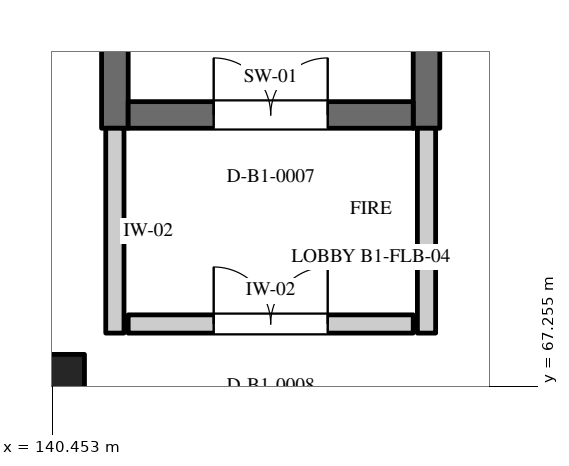
"""IFC4 building model, lengths in metres.
Left out: names, types, materials, properties, quantities, classifications, styles, units other than length and angle.
Written with IfcOpenShell. Run it as: python <this file> out.ifc"""

import sys

from ifc_helpers import new_model, si_unit, direction, frame, frame_2d, origin, origin_2d, place, context, subcontext, project, spatial, rectangle, extrude, element, fill, save


model = new_model("IFC4")
c1 = context("Model", 3, precision=1e-05, world=origin(), true_north=direction((0.0, 1.0)))
c2 = subcontext(c1, "Body", "Model", "MODEL_VIEW")
j1 = project(units=[si_unit("LENGTHUNIT", "METRE"), si_unit("PLANEANGLEUNIT", "RADIAN")], contexts=[c1])
p1 = place(None, origin())
s1 = spatial("IfcSite", under=j1, at=p1, CompositionType="ELEMENT")
p2 = place(p1, origin())
s2 = spatial("IfcBuilding", under=s1, at=p2, CompositionType="ELEMENT")
p3 = place(p2, frame((0.0, 0.0, -4.5)))
s3 = spatial("IfcBuildingStorey", under=s2, at=p3, CompositionType="ELEMENT", Elevation=-4.5)
p4 = place(p3, frame((140.4, 67.2, 0.0), z_axis=(0.0, 0.0, 1.0), x_axis=(1.0, 0.0, 0.0)))
e1 = element("IfcColumn", 1, at=p4, inside=s3, PredefinedType="COLUMN", context=c2, shape_type="SweptSolid", body=[
    extrude(rectangle(XDim=0.95, YDim=0.95, at=origin_2d()), origin(), (0.0, 0.0, 1.0), 4.5),
])
for number, where, z_axis, x_axis in (
    (2, (141.275, 70.65, 0.0), (0.0, 0.0, 1.0), (0.0, 1.0, 0.0)),
    (3, (145.375, 70.65, 0.0), (0.0, 0.0, 1.0), (0.0, 1.0, 0.0)),
):
    element("IfcWall", number, at=place(p3, frame(where, z_axis=z_axis, x_axis=x_axis)), inside=s3, PredefinedType="SHEAR", context=c2, shape_type="SweptSolid", body=[
        extrude(rectangle(XDim=10.5, YDim=0.35, at=frame_2d((5.25, 0.0))), origin(), (0.0, 0.0, 1.0), 4.5),
    ])
p5 = place(p3, frame((141.45, 70.825, 0.0), z_axis=(0.0, 0.0, 1.0), x_axis=(1.0, 0.0, 0.0)))
e4 = element("IfcWall", 4, at=p5, inside=s3, PredefinedType="SHEAR", context=c2, shape_type="SweptSolid", body=[
    extrude(rectangle(XDim=3.75, YDim=0.35, at=frame_2d((1.875, 0.0))), origin(), (0.0, 0.0, 1.0), 4.15),
])
p6 = place(p5, frame((1.125, 0.0, 0.0)))
e5 = element("IfcOpeningElement", 5, at=p6, cuts=e4, PredefinedType="OPENING", context=c2, shape_type="SweptSolid", body=[
    extrude(rectangle(XDim=1.5, YDim=2.2, at=frame_2d((0.75, 1.1))), frame((0.0, 0.187, 0.0), z_axis=(0.0, -1.0, 0.0), x_axis=(1.0, 0.0, 0.0)), (0.0, 0.0, 1.0), 0.374),
])
for number, where, z_axis, x_axis in (
    (6, (141.275, 67.955, 0.0), (0.0, 0.0, 1.0), (0.0, 1.0, 0.0)),
    (7, (145.375, 67.955, 0.0), (0.0, 0.0, 1.0), (0.0, 1.0, 0.0)),
):
    element("IfcWall", number, at=place(p3, frame(where, z_axis=z_axis, x_axis=x_axis)), inside=s3, PredefinedType="STANDARD", context=c2, shape_type="SweptSolid", body=[
        extrude(rectangle(XDim=2.695, YDim=0.24, at=frame_2d((1.347, 0.0))), origin(), (0.0, 0.0, 1.0), 4.15),
    ])
p7 = place(p3, frame((141.45, 68.075, 0.0), z_axis=(0.0, 0.0, 1.0), x_axis=(1.0, 0.0, 0.0)))
e8 = element("IfcWall", 8, at=p7, inside=s3, PredefinedType="STANDARD", context=c2, shape_type="SweptSolid", body=[
    extrude(rectangle(XDim=3.75, YDim=0.24, at=frame_2d((1.875, 0.0))), origin(), (0.0, 0.0, 1.0), 4.15),
])
p8 = place(p7, frame((1.125, 0.0, 0.0)))
e9 = element("IfcOpeningElement", 9, at=p8, cuts=e8, PredefinedType="OPENING", context=c2, shape_type="SweptSolid", body=[
    extrude(rectangle(XDim=1.5, YDim=2.2, at=frame_2d((0.75, 1.1))), frame((0.0, 0.132, 0.0), z_axis=(0.0, -1.0, 0.0), x_axis=(1.0, 0.0, 0.0)), (0.0, 0.0, 1.0), 0.264),
])
p9 = place(p6, origin())
e10 = element("IfcDoor", 10, at=p9, inside=s3, OperationType="DOUBLE_DOOR_SINGLE_SWING", PredefinedType="DOOR", context=c2, shape_type="SweptSolid", body=[
    extrude(rectangle(XDim=1.5, YDim=2.2, at=frame_2d((0.75, 1.1))), frame((0.0, 0.025, 0.0), z_axis=(0.0, -1.0, 0.0), x_axis=(1.0, 0.0, 0.0)), (0.0, 0.0, 1.0), 0.05),
])
fill(e5, e10)
p10 = place(p8, origin())
e11 = element("IfcDoor", 11, at=p10, inside=s3, OperationType="DOUBLE_DOOR_SINGLE_SWING", PredefinedType="DOOR", context=c2, shape_type="SweptSolid", body=[
    extrude(rectangle(XDim=1.5, YDim=2.2, at=frame_2d((0.75, 1.1))), frame((0.0, 0.025, 0.0), z_axis=(0.0, -1.0, 0.0), x_axis=(1.0, 0.0, 0.0)), (0.0, 0.0, 1.0), 0.05),
])
fill(e9, e11)
save(model, sys.argv[1])
